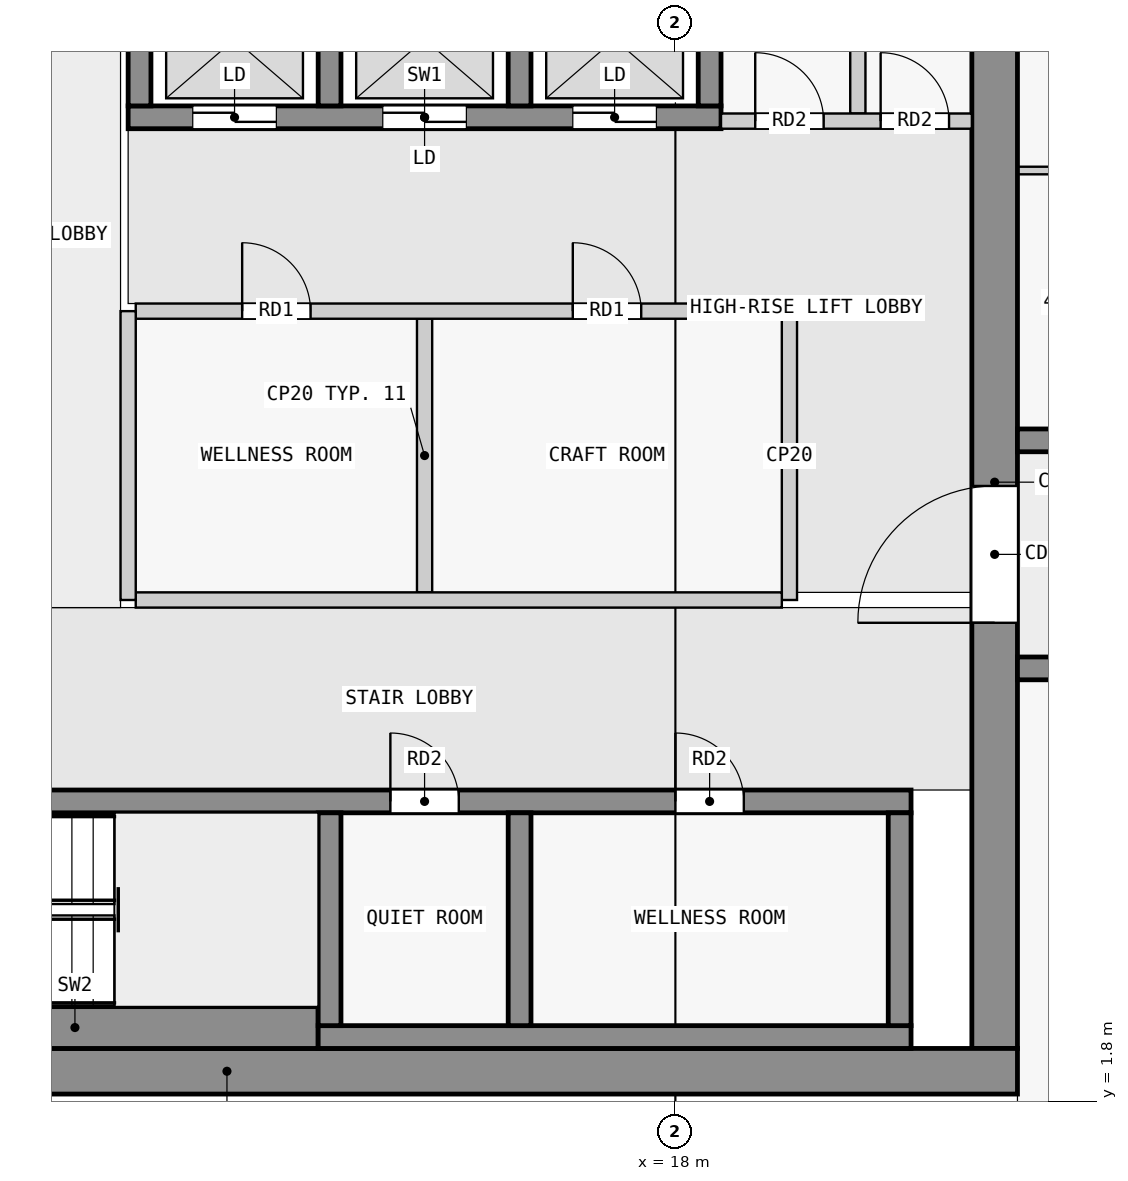
"""IFC4 building model, lengths in metres.
Left out: names, types, materials, properties, quantities, classifications, styles, units other than length and angle.
Written with IfcOpenShell. Run it as: python <this file> out.ifc"""

import sys

from ifc_helpers import new_model, si_unit, direction, frame, frame_2d, origin, place, context, subcontext, project, spatial, rectangle, extrude, element, fill, save


model = new_model("IFC4")
c1 = context("Model", 3, precision=1e-05, world=origin(), true_north=direction((0.0, 1.0)))
c2 = subcontext(c1, "Body", "Model", "MODEL_VIEW")
j1 = project(units=[si_unit("LENGTHUNIT", "METRE"), si_unit("PLANEANGLEUNIT", "RADIAN")], contexts=[c1])
p1 = place(None, origin())
s1 = spatial("IfcSite", under=j1, at=p1, CompositionType="ELEMENT")
p2 = place(p1, origin())
s2 = spatial("IfcBuilding", under=s1, at=p2, CompositionType="ELEMENT")
p3 = place(p2, frame((0.0, 0.0, 160.4)))
s3 = spatial("IfcBuildingStorey", under=s2, at=p3, CompositionType="ELEMENT", Elevation=160.4)
p4 = place(p3, frame((1.7, 2.2, 0.0), z_axis=(0.0, 0.0, 1.0), x_axis=(1.0, 0.0, 0.0)))
e1 = element("IfcWall", 1, at=p4, inside=s3, PredefinedType="SHEAR", context=c2, shape_type="SweptSolid", body=[
    extrude(rectangle(XDim=20.8, YDim=0.6, at=frame_2d((10.4, 0.0))), origin(), (0.0, 0.0, 1.0), 3.25),
])
p5 = place(p3, frame((22.2, 2.5, 0.0), z_axis=(0.0, 0.0, 1.0), x_axis=(0.0, 1.0, 0.0)))
e2 = element("IfcWall", 2, at=p5, inside=s3, PredefinedType="SHEAR", context=c2, shape_type="SweptSolid", body=[
    extrude(rectangle(XDim=14.9, YDim=0.6, at=frame_2d((7.45, 0.0))), origin(), (0.0, 0.0, 1.0), 3.25),
])
p6 = place(p5, frame((5.6, 0.0, 0.0)))
e3 = element("IfcOpeningElement", 3, at=p6, cuts=e2, PredefinedType="OPENING", context=c2, shape_type="SweptSolid", body=[
    extrude(rectangle(XDim=1.8, YDim=2.1, at=frame_2d((0.9, 1.05))), frame((0.0, 0.31, 0.0), z_axis=(0.0, -1.0, 0.0), x_axis=(1.0, 0.0, 0.0)), (0.0, 0.0, 1.0), 0.62),
])
p7 = place(p3, frame((6.9, 2.775, 0.0), z_axis=(0.0, 0.0, 1.0), x_axis=(1.0, 0.0, 0.0)))
e4 = element("IfcWall", 4, at=p7, inside=s3, PredefinedType="SHEAR", context=c2, shape_type="SweptSolid", body=[
    extrude(rectangle(XDim=6.4, YDim=0.55, at=frame_2d((3.2, 0.0))), origin(), (0.0, 0.0, 1.0), 3.25),
])
p8 = place(p3, frame((13.3, 2.65, 0.0), z_axis=(0.0, 0.0, 1.0), x_axis=(1.0, 0.0, 0.0)))
e5 = element("IfcWall", 5, at=p8, inside=s3, PredefinedType="SHEAR", context=c2, shape_type="SweptSolid", body=[
    extrude(rectangle(XDim=7.8, YDim=0.3, at=frame_2d((3.9, 0.0))), origin(), (0.0, 0.0, 1.0), 3.25),
])
for number, where, z_axis, x_axis in (
    (6, (13.45, 2.8, 0.0), (0.0, 0.0, 1.0), (0.0, 1.0, 0.0)),
    (7, (15.95, 2.8, 0.0), (0.0, 0.0, 1.0), (0.0, 1.0, 0.0)),
    (8, (20.95, 2.8, 0.0), (0.0, 0.0, 1.0), (0.0, 1.0, 0.0)),
):
    element("IfcWall", number, at=place(p3, frame(where, z_axis=z_axis, x_axis=x_axis)), inside=s3, PredefinedType="SHEAR", context=c2, shape_type="SweptSolid", body=[
        extrude(rectangle(XDim=2.8, YDim=0.3, at=frame_2d((1.4, 0.0))), origin(), (0.0, 0.0, 1.0), 3.25),
    ])
p9 = place(p3, frame((2.3, 5.75, 0.0), z_axis=(0.0, 0.0, 1.0), x_axis=(1.0, 0.0, 0.0)))
e9 = element("IfcWall", 9, at=p9, inside=s3, PredefinedType="SHEAR", context=c2, shape_type="SweptSolid", body=[
    extrude(rectangle(XDim=18.8, YDim=0.3, at=frame_2d((9.4, 0.0))), origin(), (0.0, 0.0, 1.0), 3.25),
])
p10 = place(p9, frame((4.65, 0.0, 0.0)))
e10 = element("IfcOpeningElement", 10, at=p10, cuts=e9, PredefinedType="OPENING", context=c2, shape_type="SweptSolid", body=[
    extrude(rectangle(XDim=1.1, YDim=2.1, at=frame_2d((0.55, 1.05))), frame((0.0, 0.16, 0.0), z_axis=(0.0, -1.0, 0.0), x_axis=(1.0, 0.0, 0.0)), (0.0, 0.0, 1.0), 0.32),
])
p11 = place(p9, frame((0.45, 0.0, 0.0)))
e11 = element("IfcOpeningElement", 11, at=p11, cuts=e9, PredefinedType="OPENING", context=c2, shape_type="SweptSolid", body=[
    extrude(rectangle(XDim=1.1, YDim=2.1, at=frame_2d((0.55, 1.05))), frame((0.0, 0.16, 0.0), z_axis=(0.0, -1.0, 0.0), x_axis=(1.0, 0.0, 0.0)), (0.0, 0.0, 1.0), 0.32),
])
p12 = place(p9, frame((2.75, 0.0, 0.0)))
e12 = element("IfcOpeningElement", 12, at=p12, cuts=e9, PredefinedType="OPENING", context=c2, shape_type="SweptSolid", body=[
    extrude(rectangle(XDim=1.1, YDim=2.1, at=frame_2d((0.55, 1.05))), frame((0.0, 0.16, 0.0), z_axis=(0.0, -1.0, 0.0), x_axis=(1.0, 0.0, 0.0)), (0.0, 0.0, 1.0), 0.32),
])
p13 = place(p9, frame((11.95, 0.0, 0.0)))
e13 = element("IfcOpeningElement", 13, at=p13, cuts=e9, PredefinedType="OPENING", context=c2, shape_type="SweptSolid", body=[
    extrude(rectangle(XDim=0.9, YDim=2.1, at=frame_2d((0.45, 1.05))), frame((0.0, 0.16, 0.0), z_axis=(0.0, -1.0, 0.0), x_axis=(1.0, 0.0, 0.0)), (0.0, 0.0, 1.0), 0.32),
])
p14 = place(p9, frame((15.7, 0.0, 0.0)))
e14 = element("IfcOpeningElement", 14, at=p14, cuts=e9, PredefinedType="OPENING", context=c2, shape_type="SweptSolid", body=[
    extrude(rectangle(XDim=0.9, YDim=2.1, at=frame_2d((0.45, 1.05))), frame((0.0, 0.16, 0.0), z_axis=(0.0, -1.0, 0.0), x_axis=(1.0, 0.0, 0.0)), (0.0, 0.0, 1.0), 0.32),
])
p15 = place(p3, frame((10.8, 14.75, 0.0), z_axis=(0.0, 0.0, 1.0), x_axis=(1.0, 0.0, 0.0)))
e15 = element("IfcWall", 15, at=p15, inside=s3, PredefinedType="SHEAR", context=c2, shape_type="SweptSolid", body=[
    extrude(rectangle(XDim=7.8, YDim=0.3, at=frame_2d((3.9, 0.0))), origin(), (0.0, 0.0, 1.0), 3.25),
])
p16 = place(p15, frame((0.85, 0.0, 0.0)))
e16 = element("IfcOpeningElement", 16, at=p16, cuts=e15, PredefinedType="OPENING", context=c2, shape_type="SweptSolid", body=[
    extrude(rectangle(XDim=1.1, YDim=2.1, at=frame_2d((0.55, 1.05))), frame((0.0, 0.16, 0.0), z_axis=(0.0, -1.0, 0.0), x_axis=(1.0, 0.0, 0.0)), (0.0, 0.0, 1.0), 0.32),
])
p17 = place(p15, frame((3.35, 0.0, 0.0)))
e17 = element("IfcOpeningElement", 17, at=p17, cuts=e15, PredefinedType="OPENING", context=c2, shape_type="SweptSolid", body=[
    extrude(rectangle(XDim=1.1, YDim=2.1, at=frame_2d((0.55, 1.05))), frame((0.0, 0.16, 0.0), z_axis=(0.0, -1.0, 0.0), x_axis=(1.0, 0.0, 0.0)), (0.0, 0.0, 1.0), 0.32),
])
p18 = place(p15, frame((5.85, 0.0, 0.0)))
e18 = element("IfcOpeningElement", 18, at=p18, cuts=e15, PredefinedType="OPENING", context=c2, shape_type="SweptSolid", body=[
    extrude(rectangle(XDim=1.1, YDim=2.1, at=frame_2d((0.55, 1.05))), frame((0.0, 0.16, 0.0), z_axis=(0.0, -1.0, 0.0), x_axis=(1.0, 0.0, 0.0)), (0.0, 0.0, 1.0), 0.32),
])
for number, where, z_axis, x_axis in (
    (19, (10.95, 14.9, 0.0), (0.0, 0.0, 1.0), (0.0, 1.0, 0.0)),
    (20, (13.45, 14.9, 0.0), (0.0, 0.0, 1.0), (0.0, 1.0, 0.0)),
    (21, (15.95, 14.9, 0.0), (0.0, 0.0, 1.0), (0.0, 1.0, 0.0)),
    (22, (18.45, 14.9, 0.0), (0.0, 0.0, 1.0), (0.0, 1.0, 0.0)),
):
    element("IfcWall", number, at=place(p3, frame(where, z_axis=z_axis, x_axis=x_axis)), inside=s3, PredefinedType="SHEAR", context=c2, shape_type="SweptSolid", body=[
        extrude(rectangle(XDim=2.0, YDim=0.3, at=frame_2d((1.0, 0.0))), origin(), (0.0, 0.0, 1.0), 3.25),
    ])
p19 = place(p3, frame((22.5, 7.5, 0.0), z_axis=(0.0, 0.0, 1.0), x_axis=(1.0, 0.0, 0.0)))
e23 = element("IfcWall", 23, at=p19, inside=s3, PredefinedType="SHEAR", context=c2, shape_type="SweptSolid", body=[
    extrude(rectangle(XDim=22.5, YDim=0.3, at=frame_2d((11.25, 0.0))), origin(), (0.0, 0.0, 1.0), 3.25),
])
p20 = place(p19, frame((1.75, 0.0, 0.0)))
e24 = element("IfcOpeningElement", 24, at=p20, cuts=e23, PredefinedType="OPENING", context=c2, shape_type="SweptSolid", body=[
    extrude(rectangle(XDim=1.0, YDim=2.1, at=frame_2d((0.5, 1.05))), frame((0.0, 0.16, 0.0), z_axis=(0.0, -1.0, 0.0), x_axis=(1.0, 0.0, 0.0)), (0.0, 0.0, 1.0), 0.32),
])
p21 = place(p19, frame((6.25, 0.0, 0.0)))
e25 = element("IfcOpeningElement", 25, at=p21, cuts=e23, PredefinedType="OPENING", context=c2, shape_type="SweptSolid", body=[
    extrude(rectangle(XDim=1.0, YDim=2.1, at=frame_2d((0.5, 1.05))), frame((0.0, 0.16, 0.0), z_axis=(0.0, -1.0, 0.0), x_axis=(1.0, 0.0, 0.0)), (0.0, 0.0, 1.0), 0.32),
])
p22 = place(p19, frame((10.75, 0.0, 0.0)))
e26 = element("IfcOpeningElement", 26, at=p22, cuts=e23, PredefinedType="OPENING", context=c2, shape_type="SweptSolid", body=[
    extrude(rectangle(XDim=1.0, YDim=2.1, at=frame_2d((0.5, 1.05))), frame((0.0, 0.16, 0.0), z_axis=(0.0, -1.0, 0.0), x_axis=(1.0, 0.0, 0.0)), (0.0, 0.0, 1.0), 0.32),
])
p23 = place(p19, frame((15.25, 0.0, 0.0)))
e27 = element("IfcOpeningElement", 27, at=p23, cuts=e23, PredefinedType="OPENING", context=c2, shape_type="SweptSolid", body=[
    extrude(rectangle(XDim=1.0, YDim=2.1, at=frame_2d((0.5, 1.05))), frame((0.0, 0.16, 0.0), z_axis=(0.0, -1.0, 0.0), x_axis=(1.0, 0.0, 0.0)), (0.0, 0.0, 1.0), 0.32),
])
p24 = place(p19, frame((18.75, 0.0, 0.0)))
e28 = element("IfcOpeningElement", 28, at=p24, cuts=e23, PredefinedType="OPENING", context=c2, shape_type="SweptSolid", body=[
    extrude(rectangle(XDim=0.9, YDim=2.1, at=frame_2d((0.45, 1.05))), frame((0.0, 0.16, 0.0), z_axis=(0.0, -1.0, 0.0), x_axis=(1.0, 0.0, 0.0)), (0.0, 0.0, 1.0), 0.32),
])
p25 = place(p19, frame((20.95, 0.0, 0.0)))
e29 = element("IfcOpeningElement", 29, at=p25, cuts=e23, PredefinedType="OPENING", context=c2, shape_type="SweptSolid", body=[
    extrude(rectangle(XDim=1.0, YDim=2.1, at=frame_2d((0.5, 1.05))), frame((0.0, 0.16, 0.0), z_axis=(0.0, -1.0, 0.0), x_axis=(1.0, 0.0, 0.0)), (0.0, 0.0, 1.0), 0.32),
])
p26 = place(p3, frame((22.5, 10.5, 0.0), z_axis=(0.0, 0.0, 1.0), x_axis=(1.0, 0.0, 0.0)))
e30 = element("IfcWall", 30, at=p26, inside=s3, PredefinedType="SHEAR", context=c2, shape_type="SweptSolid", body=[
    extrude(rectangle(XDim=22.5, YDim=0.3, at=frame_2d((11.25, 0.0))), origin(), (0.0, 0.0, 1.0), 3.25),
])
p27 = place(p26, frame((1.75, 0.0, 0.0)))
e31 = element("IfcOpeningElement", 31, at=p27, cuts=e30, PredefinedType="OPENING", context=c2, shape_type="SweptSolid", body=[
    extrude(rectangle(XDim=1.0, YDim=2.1, at=frame_2d((0.5, 1.05))), frame((0.0, 0.16, 0.0), z_axis=(0.0, -1.0, 0.0), x_axis=(1.0, 0.0, 0.0)), (0.0, 0.0, 1.0), 0.32),
])
p28 = place(p26, frame((6.25, 0.0, 0.0)))
e32 = element("IfcOpeningElement", 32, at=p28, cuts=e30, PredefinedType="OPENING", context=c2, shape_type="SweptSolid", body=[
    extrude(rectangle(XDim=1.0, YDim=2.1, at=frame_2d((0.5, 1.05))), frame((0.0, 0.16, 0.0), z_axis=(0.0, -1.0, 0.0), x_axis=(1.0, 0.0, 0.0)), (0.0, 0.0, 1.0), 0.32),
])
p29 = place(p26, frame((10.35, 0.0, 0.0)))
e33 = element("IfcOpeningElement", 33, at=p29, cuts=e30, PredefinedType="OPENING", context=c2, shape_type="SweptSolid", body=[
    extrude(rectangle(XDim=1.8, YDim=2.1, at=frame_2d((0.9, 1.05))), frame((0.0, 0.16, 0.0), z_axis=(0.0, -1.0, 0.0), x_axis=(1.0, 0.0, 0.0)), (0.0, 0.0, 1.0), 0.32),
])
p30 = place(p26, frame((16.85, 0.0, 0.0)))
e34 = element("IfcOpeningElement", 34, at=p30, cuts=e30, PredefinedType="OPENING", context=c2, shape_type="SweptSolid", body=[
    extrude(rectangle(XDim=1.0, YDim=2.1, at=frame_2d((0.5, 1.05))), frame((0.0, 0.16, 0.0), z_axis=(0.0, -1.0, 0.0), x_axis=(1.0, 0.0, 0.0)), (0.0, 0.0, 1.0), 0.32),
])
p31 = place(p3, frame((10.8, 8.4, 0.0), z_axis=(0.0, 0.0, 1.0), x_axis=(0.0, 1.0, 0.0)))
e35 = element("IfcWall", 35, at=p31, inside=s3, PredefinedType="PARTITIONING", context=c2, shape_type="SweptSolid", body=[
    extrude(rectangle(XDim=3.8, YDim=0.2, at=frame_2d((1.9, 0.0))), origin(), (0.0, 0.0, 1.0), 3.25),
])
p32 = place(p3, frame((10.9, 8.4, 0.0), z_axis=(0.0, 0.0, 1.0), x_axis=(1.0, 0.0, 0.0)))
e36 = element("IfcWall", 36, at=p32, inside=s3, PredefinedType="PARTITIONING", context=c2, shape_type="SweptSolid", body=[
    extrude(rectangle(XDim=8.5, YDim=0.2, at=frame_2d((4.25, 0.0))), origin(), (0.0, 0.0, 1.0), 3.25),
])
p33 = place(p3, frame((19.5, 8.4, 0.0), z_axis=(0.0, 0.0, 1.0), x_axis=(0.0, 1.0, 0.0)))
e37 = element("IfcWall", 37, at=p33, inside=s3, PredefinedType="PARTITIONING", context=c2, shape_type="SweptSolid", body=[
    extrude(rectangle(XDim=3.8, YDim=0.2, at=frame_2d((1.9, 0.0))), origin(), (0.0, 0.0, 1.0), 3.25),
])
p34 = place(p3, frame((10.9, 12.2, 0.0), z_axis=(0.0, 0.0, 1.0), x_axis=(1.0, 0.0, 0.0)))
e38 = element("IfcWall", 38, at=p34, inside=s3, PredefinedType="PARTITIONING", context=c2, shape_type="SweptSolid", body=[
    extrude(rectangle(XDim=8.5, YDim=0.2, at=frame_2d((4.25, 0.0))), origin(), (0.0, 0.0, 1.0), 3.25),
])
p35 = place(p34, frame((1.4, 0.0, 0.0)))
e39 = element("IfcOpeningElement", 39, at=p35, cuts=e38, PredefinedType="OPENING", context=c2, shape_type="SweptSolid", body=[
    extrude(rectangle(XDim=0.9, YDim=2.1, at=frame_2d((0.45, 1.05))), frame((0.0, 0.11, 0.0), z_axis=(0.0, -1.0, 0.0), x_axis=(1.0, 0.0, 0.0)), (0.0, 0.0, 1.0), 0.22),
])
p36 = place(p34, frame((5.75, 0.0, 0.0)))
e40 = element("IfcOpeningElement", 40, at=p36, cuts=e38, PredefinedType="OPENING", context=c2, shape_type="SweptSolid", body=[
    extrude(rectangle(XDim=0.9, YDim=2.1, at=frame_2d((0.45, 1.05))), frame((0.0, 0.11, 0.0), z_axis=(0.0, -1.0, 0.0), x_axis=(1.0, 0.0, 0.0)), (0.0, 0.0, 1.0), 0.22),
])
p37 = place(p3, frame((14.7, 8.5, 0.0), z_axis=(0.0, 0.0, 1.0), x_axis=(0.0, 1.0, 0.0)))
e41 = element("IfcWall", 41, at=p37, inside=s3, PredefinedType="PARTITIONING", context=c2, shape_type="SweptSolid", body=[
    extrude(rectangle(XDim=3.6, YDim=0.2, at=frame_2d((1.8, 0.0))), origin(), (0.0, 0.0, 1.0), 3.25),
])
p38 = place(p3, frame((18.6, 14.7, 0.0), z_axis=(0.0, 0.0, 1.0), x_axis=(1.0, 0.0, 0.0)))
e42 = element("IfcWall", 42, at=p38, inside=s3, PredefinedType="PARTITIONING", context=c2, shape_type="SweptSolid", body=[
    extrude(rectangle(XDim=3.3, YDim=0.2, at=frame_2d((1.65, 0.0))), origin(), (0.0, 0.0, 1.0), 3.25),
])
p39 = place(p38, frame((0.45, 0.0, 0.0)))
e43 = element("IfcOpeningElement", 43, at=p39, cuts=e42, PredefinedType="OPENING", context=c2, shape_type="SweptSolid", body=[
    extrude(rectangle(XDim=0.9, YDim=2.1, at=frame_2d((0.45, 1.05))), frame((0.0, 0.11, 0.0), z_axis=(0.0, -1.0, 0.0), x_axis=(1.0, 0.0, 0.0)), (0.0, 0.0, 1.0), 0.22),
])
p40 = place(p38, frame((2.1, 0.0, 0.0)))
e44 = element("IfcOpeningElement", 44, at=p40, cuts=e42, PredefinedType="OPENING", context=c2, shape_type="SweptSolid", body=[
    extrude(rectangle(XDim=0.9, YDim=2.1, at=frame_2d((0.45, 1.05))), frame((0.0, 0.11, 0.0), z_axis=(0.0, -1.0, 0.0), x_axis=(1.0, 0.0, 0.0)), (0.0, 0.0, 1.0), 0.22),
])
p41 = place(p3, frame((20.4, 14.8, 0.0), z_axis=(0.0, 0.0, 1.0), x_axis=(0.0, 1.0, 0.0)))
e45 = element("IfcWall", 45, at=p41, inside=s3, PredefinedType="PARTITIONING", context=c2, shape_type="SweptSolid", body=[
    extrude(rectangle(XDim=2.6, YDim=0.2, at=frame_2d((1.3, 0.0))), origin(), (0.0, 0.0, 1.0), 3.25),
])
p42 = place(p3, frame((23.95, 14.05, 0.0), z_axis=(0.0, 0.0, 1.0), x_axis=(-1.0, 0.0, 0.0)))
e46 = element("IfcWall", 46, at=p42, inside=s3, PredefinedType="PARTITIONING", context=c2, shape_type="SweptSolid", body=[
    extrude(rectangle(XDim=1.45, YDim=0.1, at=frame_2d((0.725, 0.0))), origin(), (0.0, 0.0, 1.0), 3.25),
])
p43 = place(p35, origin())
e47 = element("IfcDoor", 47, at=p43, inside=s3, OperationType="SINGLE_SWING_LEFT", PredefinedType="DOOR", context=c2, shape_type="SweptSolid", body=[
    extrude(rectangle(XDim=0.9, YDim=2.1, at=frame_2d((0.45, 1.05))), frame((0.0, 0.025, 0.0), z_axis=(0.0, -1.0, 0.0), x_axis=(1.0, 0.0, 0.0)), (0.0, 0.0, 1.0), 0.05),
])
fill(e39, e47)
p44 = place(p36, origin())
e48 = element("IfcDoor", 48, at=p44, inside=s3, OperationType="SINGLE_SWING_LEFT", PredefinedType="DOOR", context=c2, shape_type="SweptSolid", body=[
    extrude(rectangle(XDim=0.9, YDim=2.1, at=frame_2d((0.45, 1.05))), frame((0.0, 0.025, 0.0), z_axis=(0.0, -1.0, 0.0), x_axis=(1.0, 0.0, 0.0)), (0.0, 0.0, 1.0), 0.05),
])
fill(e40, e48)
p45 = place(p16, origin())
e49 = element("IfcDoor", 49, at=p45, inside=s3, OperationType="DOUBLE_DOOR_SLIDING", PredefinedType="DOOR", context=c2, shape_type="SweptSolid", body=[
    extrude(rectangle(XDim=1.1, YDim=2.1, at=frame_2d((0.55, 1.05))), frame((0.0, 0.025, 0.0), z_axis=(0.0, -1.0, 0.0), x_axis=(1.0, 0.0, 0.0)), (0.0, 0.0, 1.0), 0.05),
])
fill(e16, e49)
p46 = place(p17, origin())
e50 = element("IfcDoor", 50, at=p46, inside=s3, OperationType="DOUBLE_DOOR_SLIDING", PredefinedType="DOOR", context=c2, shape_type="SweptSolid", body=[
    extrude(rectangle(XDim=1.1, YDim=2.1, at=frame_2d((0.55, 1.05))), frame((0.0, 0.025, 0.0), z_axis=(0.0, -1.0, 0.0), x_axis=(1.0, 0.0, 0.0)), (0.0, 0.0, 1.0), 0.05),
])
fill(e17, e50)
p47 = place(p18, origin())
e51 = element("IfcDoor", 51, at=p47, inside=s3, OperationType="DOUBLE_DOOR_SLIDING", PredefinedType="DOOR", context=c2, shape_type="SweptSolid", body=[
    extrude(rectangle(XDim=1.1, YDim=2.1, at=frame_2d((0.55, 1.05))), frame((0.0, 0.025, 0.0), z_axis=(0.0, -1.0, 0.0), x_axis=(1.0, 0.0, 0.0)), (0.0, 0.0, 1.0), 0.05),
])
fill(e18, e51)
p48 = place(p6, origin())
e52 = element("IfcDoor", 52, at=p48, inside=s3, OperationType="DOUBLE_DOOR_SINGLE_SWING", PredefinedType="DOOR", context=c2, shape_type="SweptSolid", body=[
    extrude(rectangle(XDim=1.8, YDim=2.1, at=frame_2d((0.9, 1.05))), frame((0.0, 0.025, 0.0), z_axis=(0.0, -1.0, 0.0), x_axis=(1.0, 0.0, 0.0)), (0.0, 0.0, 1.0), 0.05),
])
fill(e3, e52)
p49 = place(p39, origin())
e53 = element("IfcDoor", 53, at=p49, inside=s3, OperationType="SINGLE_SWING_LEFT", PredefinedType="DOOR", context=c2, shape_type="SweptSolid", body=[
    extrude(rectangle(XDim=0.9, YDim=2.1, at=frame_2d((0.45, 1.05))), frame((0.0, 0.025, 0.0), z_axis=(0.0, -1.0, 0.0), x_axis=(1.0, 0.0, 0.0)), (0.0, 0.0, 1.0), 0.05),
])
fill(e43, e53)
p50 = place(p40, origin())
e54 = element("IfcDoor", 54, at=p50, inside=s3, OperationType="SINGLE_SWING_LEFT", PredefinedType="DOOR", context=c2, shape_type="SweptSolid", body=[
    extrude(rectangle(XDim=0.9, YDim=2.1, at=frame_2d((0.45, 1.05))), frame((0.0, 0.025, 0.0), z_axis=(0.0, -1.0, 0.0), x_axis=(1.0, 0.0, 0.0)), (0.0, 0.0, 1.0), 0.05),
])
fill(e44, e54)
p51 = place(p13, origin())
e55 = element("IfcDoor", 55, at=p51, inside=s3, OperationType="SINGLE_SWING_LEFT", PredefinedType="DOOR", context=c2, shape_type="SweptSolid", body=[
    extrude(rectangle(XDim=0.9, YDim=2.1, at=frame_2d((0.45, 1.05))), frame((0.0, 0.025, 0.0), z_axis=(0.0, -1.0, 0.0), x_axis=(1.0, 0.0, 0.0)), (0.0, 0.0, 1.0), 0.05),
])
fill(e13, e55)
p52 = place(p14, origin())
e56 = element("IfcDoor", 56, at=p52, inside=s3, OperationType="SINGLE_SWING_LEFT", PredefinedType="DOOR", context=c2, shape_type="SweptSolid", body=[
    extrude(rectangle(XDim=0.9, YDim=2.1, at=frame_2d((0.45, 1.05))), frame((0.0, 0.025, 0.0), z_axis=(0.0, -1.0, 0.0), x_axis=(1.0, 0.0, 0.0)), (0.0, 0.0, 1.0), 0.05),
])
fill(e14, e56)
save(model, sys.argv[1])
